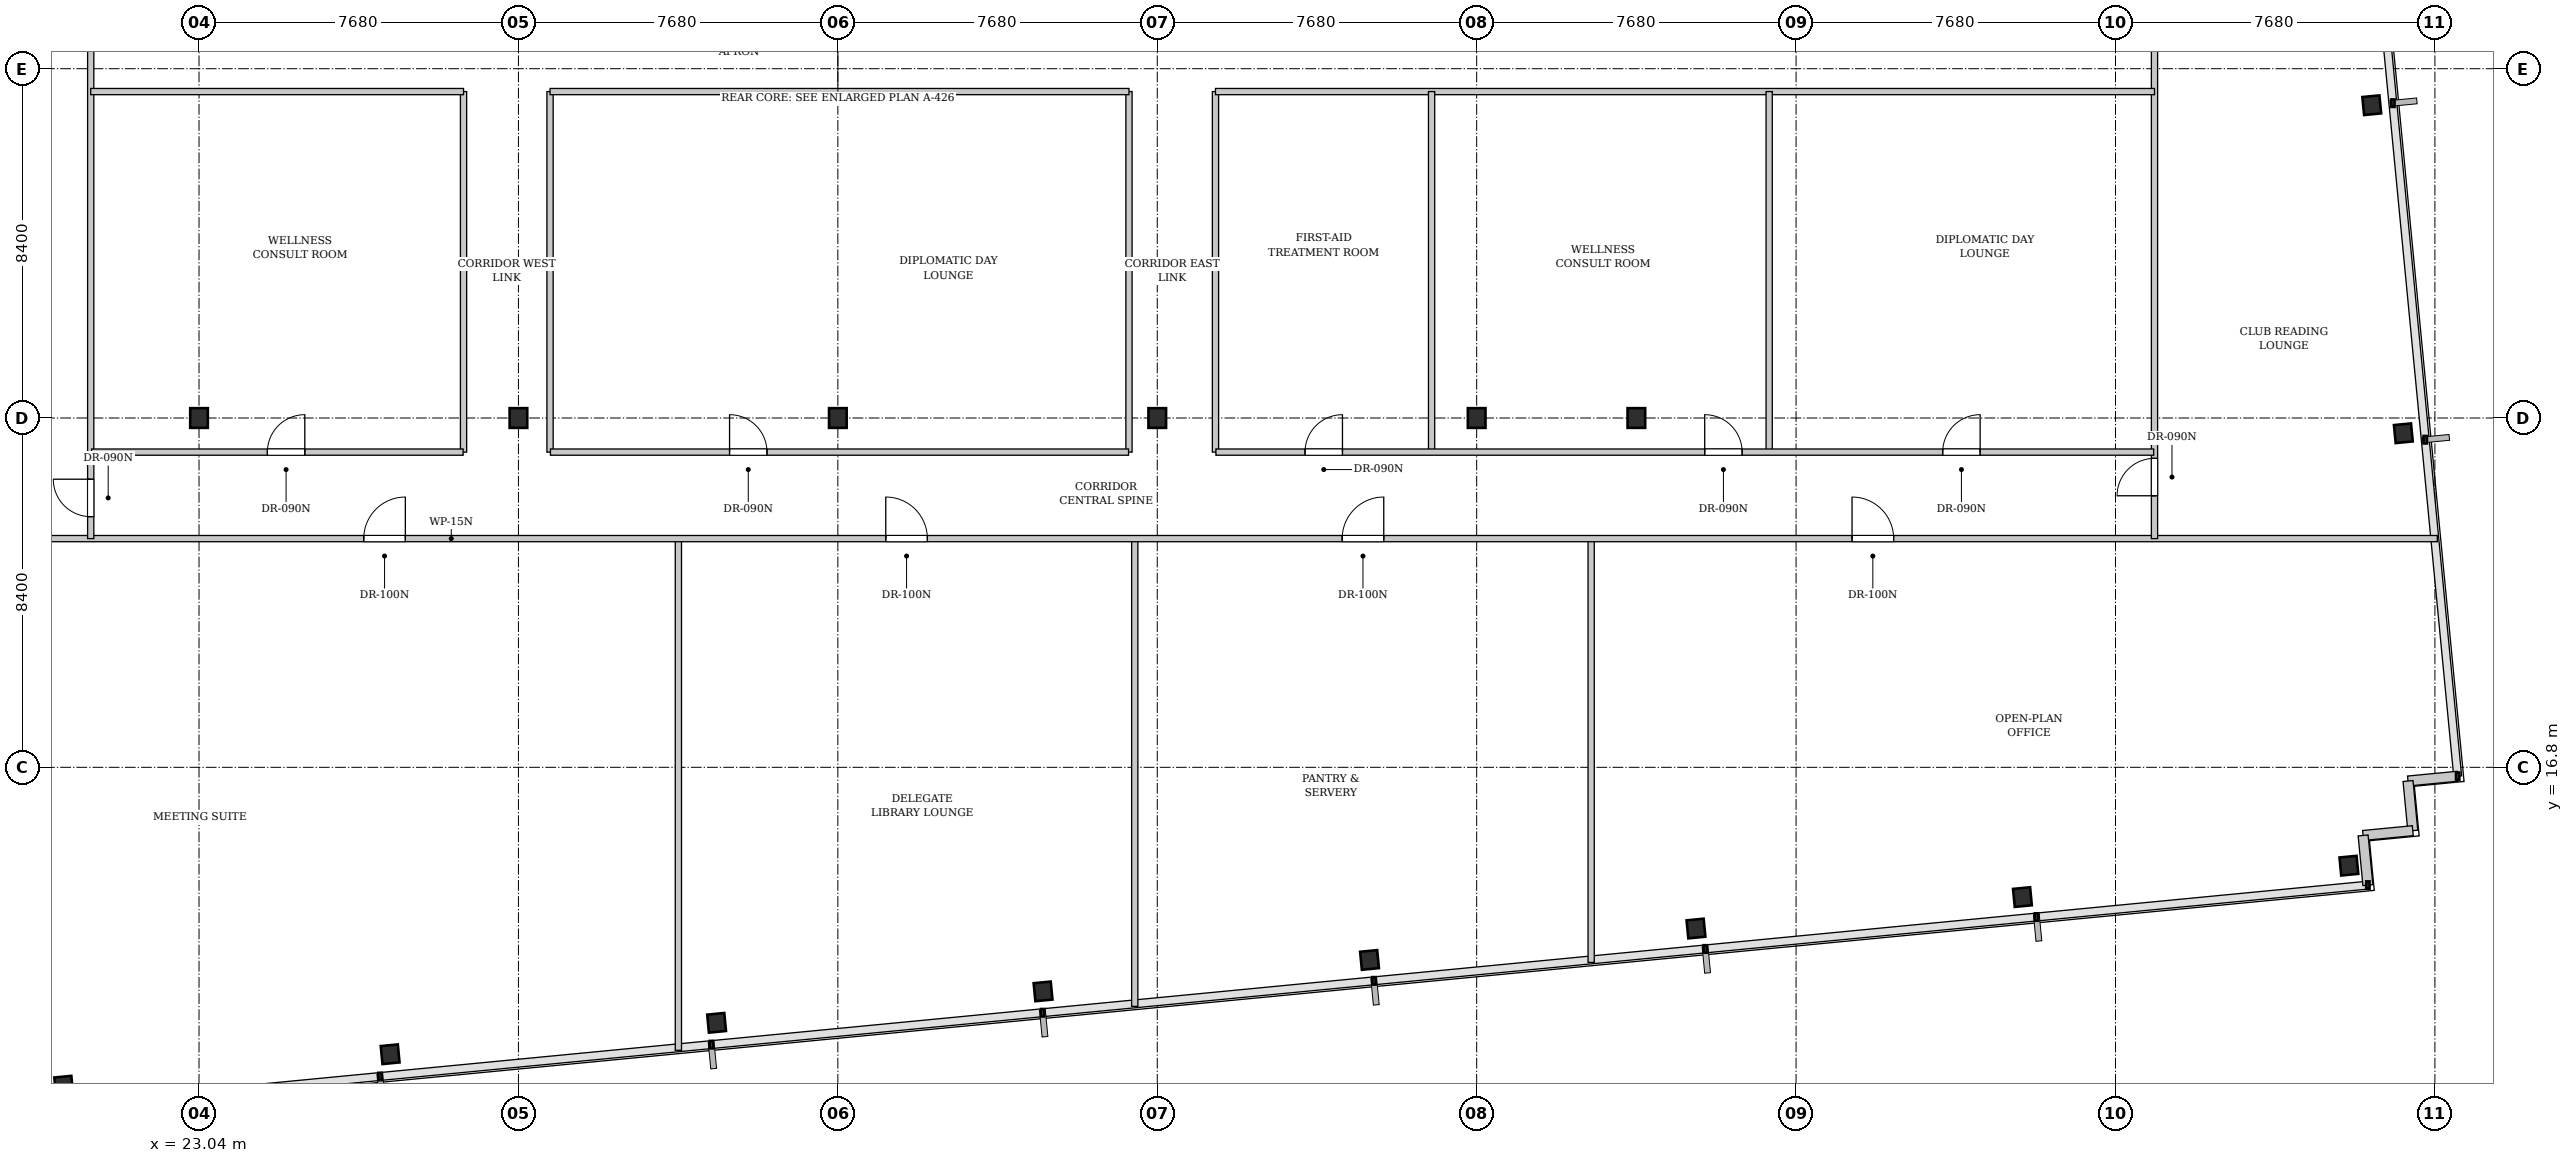
"""IFC4 building model, lengths in metres.
Left out: names, types, materials, properties, quantities, classifications, styles, units other than length and angle.
Written with IfcOpenShell. Run it as: python <this file> out.ifc"""

import sys

from ifc_helpers import new_model, si_unit, direction, frame, frame_2d, origin, origin_2d, place, context, subcontext, project, spatial, rectangle, i_section, extrude, element, fill, save


model = new_model("IFC4")
c1 = context("Model", 3, precision=1e-05, world=origin(), true_north=direction((0.0, 1.0)))
c2 = subcontext(c1, "Body", "Model", "MODEL_VIEW")
j1 = project(units=[si_unit("LENGTHUNIT", "METRE"), si_unit("PLANEANGLEUNIT", "RADIAN")], contexts=[c1])
p1 = place(None, origin())
s1 = spatial("IfcSite", under=j1, at=p1, CompositionType="ELEMENT")
p2 = place(p1, origin())
s2 = spatial("IfcBuilding", under=s1, at=p2, CompositionType="ELEMENT")
p3 = place(p2, frame((0.0, 0.0, 96.5)))
s3 = spatial("IfcBuildingStorey", under=s2, at=p3, CompositionType="ELEMENT", Elevation=96.5)
for number, where, z_axis, x_axis in (
    (1, (23.04, 25.2, 0.0), (0.0, 0.0, 1.0), (1.0, 0.0, 0.0)),
    (2, (30.72, 25.2, 0.0), (0.0, 0.0, 1.0), (1.0, 0.0, 0.0)),
    (3, (38.4, 25.2, 0.0), (0.0, 0.0, 1.0), (1.0, 0.0, 0.0)),
    (4, (46.08, 25.2, 0.0), (0.0, 0.0, 1.0), (1.0, 0.0, 0.0)),
    (5, (53.76, 25.2, 0.0), (0.0, 0.0, 1.0), (1.0, 0.0, 0.0)),
    (6, (57.6, 25.2, 0.0), (0.0, 0.0, 1.0), (1.0, 0.0, 0.0)),
):
    element("IfcColumn", number, at=place(p3, frame(where, z_axis=z_axis, x_axis=x_axis)), inside=s3, PredefinedType="COLUMN", context=c2, shape_type="SweptSolid", body=[
        extrude(i_section(OverallWidth=0.424, OverallDepth=0.474, WebThickness=0.047, FlangeThickness=0.077, FilletRadius=0.015, at=origin_2d()), origin(), (0.0, 0.0, 1.0), 3.4),
    ])
for number, where, z_axis, x_axis in (
    (7, (19.786, 9.144, 0.0), (0.0, 0.0, 1.0), (0.995, 0.096, 0.0)),
    (8, (27.635, 9.9, 0.0), (0.0, 0.0, 1.0), (0.995, 0.096, 0.0)),
    (9, (35.485, 10.656, 0.0), (0.0, 0.0, 1.0), (0.995, 0.096, 0.0)),
    (10, (43.334, 11.412, 0.0), (0.0, 0.0, 1.0), (0.995, 0.096, 0.0)),
    (11, (51.184, 12.167, 0.0), (0.0, 0.0, 1.0), (0.995, 0.096, 0.0)),
    (12, (59.033, 12.923, 0.0), (0.0, 0.0, 1.0), (0.995, 0.096, 0.0)),
    (13, (66.883, 13.679, 0.0), (0.0, 0.0, 1.0), (0.995, 0.096, 0.0)),
    (14, (74.732, 14.435, 0.0), (0.0, 0.0, 1.0), (0.995, 0.096, 0.0)),
    (15, (76.041, 24.833, 0.0), (0.0, 0.0, 1.0), (0.995, 0.096, 0.0)),
    (16, (75.282, 32.722, 0.0), (0.0, 0.0, 1.0), (0.995, 0.096, 0.0)),
):
    element("IfcColumn", number, at=place(p3, frame(where, z_axis=z_axis, x_axis=x_axis)), inside=s3, PredefinedType="COLUMN", context=c2, shape_type="SweptSolid", body=[
        extrude(i_section(OverallWidth=0.412, OverallDepth=0.435, WebThickness=0.036, FlangeThickness=0.058, FilletRadius=0.015, at=origin_2d()), origin(), (0.0, 0.0, 1.0), 3.4),
    ])
p4 = place(p3, frame((19.427, 8.597, 0.0), z_axis=(0.0, 0.0, 1.0), x_axis=(-0.095817067274, 0.995398960025, 0.0)))
e17 = element("IfcWall", 17, at=p4, inside=s3, PredefinedType="SOLIDWALL", context=c2, shape_type="SweptSolid", body=[
    extrude(rectangle(XDim=1.2, YDim=0.24, at=frame_2d((0.6, 0.0))), origin(), (0.0, 0.0, 1.0), 3.18),
])
p5 = place(p3, frame((77.348, 16.586, 0.0), z_axis=(0.0, 0.0, 1.0), x_axis=(-0.995397091755, -0.095836473879, 0.0)))
e18 = element("IfcWall", 18, at=p5, inside=s3, PredefinedType="SOLIDWALL", context=c2, shape_type="SweptSolid", body=[
    extrude(rectangle(XDim=1.2, YDim=0.24, at=frame_2d((0.6, 0.0))), origin(), (0.0, 0.0, 1.0), 3.18),
])
for number, where, z_axis, x_axis in (
    (19, (76.153, 16.471, 0.0), (0.0, 0.0, 1.0), (0.096, -0.995, 0.0)),
    (20, (76.268, 15.276, 0.0), (0.0, 0.0, 1.0), (-0.995, -0.096, 0.0)),
):
    element("IfcWall", number, at=place(p3, frame(where, z_axis=z_axis, x_axis=x_axis)), inside=s3, PredefinedType="SOLIDWALL", context=c2, shape_type="SweptSolid", body=[
        extrude(rectangle(XDim=1.2, YDim=0.24, at=frame_2d((0.6, 0.0))), origin(), (0.0, 0.0, 1.0), 3.18),
    ])
p6 = place(p3, frame((75.074, 15.161, 0.0), z_axis=(0.0, 0.0, 1.0), x_axis=(0.095836473879, -0.995397091755, 0.0)))
e21 = element("IfcWall", 21, at=p6, inside=s3, PredefinedType="SOLIDWALL", context=c2, shape_type="SweptSolid", body=[
    extrude(rectangle(XDim=1.2, YDim=0.24, at=frame_2d((0.6, 0.0))), origin(), (0.0, 0.0, 1.0), 3.18),
])
p7 = place(p3, frame((34.566, 9.995, 0.0), z_axis=(0.0, 0.0, 1.0), x_axis=(0.0, 1.0, 0.0)))
e22 = element("IfcWall", 22, at=p7, inside=s3, PredefinedType="PARTITIONING", context=c2, shape_type="SweptSolid", body=[
    extrude(rectangle(XDim=12.325, YDim=0.15, at=frame_2d((6.163, 0.0))), origin(), (0.0, 0.0, 1.0), 3.18),
])
p8 = place(p3, frame((45.539, 11.052, 0.0), z_axis=(0.0, 0.0, 1.0), x_axis=(0.0, 1.0, 0.0)))
e23 = element("IfcWall", 23, at=p8, inside=s3, PredefinedType="PARTITIONING", context=c2, shape_type="SweptSolid", body=[
    extrude(rectangle(XDim=11.269, YDim=0.15, at=frame_2d((5.634, 0.0))), origin(), (0.0, 0.0, 1.0), 2.525),
])
p9 = place(p3, frame((56.513, 12.108, 0.0), z_axis=(0.0, 0.0, 1.0), x_axis=(0.0, 1.0, 0.0)))
e24 = element("IfcWall", 24, at=p9, inside=s3, PredefinedType="PARTITIONING", context=c2, shape_type="SweptSolid", body=[
    extrude(rectangle(XDim=10.212, YDim=0.15, at=frame_2d((5.106, 0.0))), origin(), (0.0, 0.0, 1.0), 3.18),
])
p10 = place(p3, frame((15.636, 22.3, 0.0), z_axis=(0.0, 0.0, 1.0), x_axis=(1.0, 0.0, 0.0)))
e25 = element("IfcWall", 25, at=p10, inside=s3, PredefinedType="PARTITIONING", context=c2, shape_type="SweptSolid", body=[
    extrude(rectangle(XDim=61.222, YDim=0.15, at=frame_2d((30.611, 0.0))), origin(), (0.0, 0.0, 1.0), 3.18),
])
p11 = place(p10, frame((11.365, 0.0, 0.0)))
e26 = element("IfcOpeningElement", 26, at=p11, cuts=e25, PredefinedType="OPENING", context=c2, shape_type="SweptSolid", body=[
    extrude(rectangle(XDim=1.0, YDim=2.15, at=frame_2d((0.5, 1.075))), frame((0.0, 0.085, 0.0), z_axis=(0.0, -1.0, 0.0), x_axis=(1.0, 0.0, 0.0)), (0.0, 0.0, 1.0), 0.17),
])
p12 = place(p10, frame((23.917, 0.0, 0.0)))
e27 = element("IfcOpeningElement", 27, at=p12, cuts=e25, PredefinedType="OPENING", context=c2, shape_type="SweptSolid", body=[
    extrude(rectangle(XDim=1.0, YDim=2.15, at=frame_2d((0.5, 1.075))), frame((0.0, 0.085, 0.0), z_axis=(0.0, -1.0, 0.0), x_axis=(1.0, 0.0, 0.0)), (0.0, 0.0, 1.0), 0.17),
])
p13 = place(p10, frame((34.89, 0.0, 0.0)))
e28 = element("IfcOpeningElement", 28, at=p13, cuts=e25, PredefinedType="OPENING", context=c2, shape_type="SweptSolid", body=[
    extrude(rectangle(XDim=1.0, YDim=2.15, at=frame_2d((0.5, 1.075))), frame((0.0, 0.085, 0.0), z_axis=(0.0, -1.0, 0.0), x_axis=(1.0, 0.0, 0.0)), (0.0, 0.0, 1.0), 0.17),
])
p14 = place(p10, frame((47.15, 0.0, 0.0)))
e29 = element("IfcOpeningElement", 29, at=p14, cuts=e25, PredefinedType="OPENING", context=c2, shape_type="SweptSolid", body=[
    extrude(rectangle(XDim=1.0, YDim=2.15, at=frame_2d((0.5, 1.075))), frame((0.0, 0.085, 0.0), z_axis=(0.0, -1.0, 0.0), x_axis=(1.0, 0.0, 0.0)), (0.0, 0.0, 1.0), 0.17),
])
p15 = place(p3, frame((20.436, 22.3, 0.0), z_axis=(0.0, 0.0, 1.0), x_axis=(0.0, 1.0, 0.0)))
e30 = element("IfcWall", 30, at=p15, inside=s3, PredefinedType="PARTITIONING", context=c2, shape_type="SweptSolid", body=[
    extrude(rectangle(XDim=23.948, YDim=0.15, at=frame_2d((11.974, 0.0))), origin(), (0.0, 0.0, 1.0), 3.18),
])
p16 = place(p15, frame((0.528, 0.0, 0.0)))
e31 = element("IfcOpeningElement", 31, at=p16, cuts=e30, PredefinedType="OPENING", context=c2, shape_type="SweptSolid", body=[
    extrude(rectangle(XDim=0.9, YDim=2.15, at=frame_2d((0.45, 1.075))), frame((0.0, 0.085, 0.0), z_axis=(0.0, -1.0, 0.0), x_axis=(1.0, 0.0, 0.0)), (0.0, 0.0, 1.0), 0.17),
])
p17 = place(p3, frame((70.058, 22.3, 0.0), z_axis=(0.0, 0.0, 1.0), x_axis=(0.0, 1.0, 0.0)))
e32 = element("IfcWall", 32, at=p17, inside=s3, PredefinedType="PARTITIONING", context=c2, shape_type="SweptSolid", body=[
    extrude(rectangle(XDim=28.726, YDim=0.15, at=frame_2d((14.363, 0.0))), origin(), (0.0, 0.0, 1.0), 3.18),
])
p18 = place(p17, frame((1.03, 0.0, 0.0)))
e33 = element("IfcOpeningElement", 33, at=p18, cuts=e32, PredefinedType="OPENING", context=c2, shape_type="SweptSolid", body=[
    extrude(rectangle(XDim=0.9, YDim=2.15, at=frame_2d((0.45, 1.075))), frame((0.0, 0.085, 0.0), z_axis=(0.0, -1.0, 0.0), x_axis=(1.0, 0.0, 0.0)), (0.0, 0.0, 1.0), 0.17),
])
for number, where, z_axis, x_axis in (
    (34, (29.4, 24.38, 0.0), (0.0, 0.0, 1.0), (0.0, 1.0, 0.0)),
    (35, (31.48, 24.38, 0.0), (0.0, 0.0, 1.0), (0.0, 1.0, 0.0)),
    (36, (45.4, 24.38, 0.0), (0.0, 0.0, 1.0), (0.0, 1.0, 0.0)),
    (37, (47.48, 24.38, 0.0), (0.0, 0.0, 1.0), (0.0, 1.0, 0.0)),
):
    element("IfcWall", number, at=place(p3, frame(where, z_axis=z_axis, x_axis=x_axis)), inside=s3, PredefinedType="PARTITIONING", context=c2, shape_type="SweptSolid", body=[
        extrude(rectangle(XDim=8.67, YDim=0.15, at=frame_2d((4.335, 0.0))), origin(), (0.0, 0.0, 1.0), 3.18),
    ])
p19 = place(p3, frame((20.436, 33.05, 0.0), z_axis=(0.0, 0.0, 1.0), x_axis=(1.0, 0.0, 0.0)))
e38 = element("IfcWall", 38, at=p19, inside=s3, PredefinedType="PARTITIONING", context=c2, shape_type="SweptSolid", body=[
    extrude(rectangle(XDim=8.964, YDim=0.15, at=frame_2d((4.482, 0.0))), origin(), (0.0, 0.0, 1.0), 3.18),
])
p20 = place(p3, frame((31.48, 33.05, 0.0), z_axis=(0.0, 0.0, 1.0), x_axis=(1.0, 0.0, 0.0)))
e39 = element("IfcWall", 39, at=p20, inside=s3, PredefinedType="PARTITIONING", context=c2, shape_type="SweptSolid", body=[
    extrude(rectangle(XDim=13.92, YDim=0.15, at=frame_2d((6.96, 0.0))), origin(), (0.0, 0.0, 1.0), 3.18),
])
p21 = place(p3, frame((47.48, 33.05, 0.0), z_axis=(0.0, 0.0, 1.0), x_axis=(1.0, 0.0, 0.0)))
e40 = element("IfcWall", 40, at=p21, inside=s3, PredefinedType="PARTITIONING", context=c2, shape_type="SweptSolid", body=[
    extrude(rectangle(XDim=22.578, YDim=0.15, at=frame_2d((11.289, 0.0))), origin(), (0.0, 0.0, 1.0), 2.525),
])
p22 = place(p3, frame((20.456, 24.38, 0.0), z_axis=(0.0, 0.0, 1.0), x_axis=(1.0, 0.0, 0.0)))
e41 = element("IfcWall", 41, at=p22, inside=s3, PredefinedType="PARTITIONING", context=c2, shape_type="SweptSolid", body=[
    extrude(rectangle(XDim=8.934, YDim=0.15, at=frame_2d((4.467, 0.0))), origin(), (0.0, 0.0, 1.0), 3.18),
])
p23 = place(p22, frame((4.227, 0.0, 0.0)))
e42 = element("IfcOpeningElement", 42, at=p23, cuts=e41, PredefinedType="OPENING", context=c2, shape_type="SweptSolid", body=[
    extrude(rectangle(XDim=0.9, YDim=2.15, at=frame_2d((0.45, 1.075))), frame((0.0, 0.085, 0.0), z_axis=(0.0, -1.0, 0.0), x_axis=(1.0, 0.0, 0.0)), (0.0, 0.0, 1.0), 0.17),
])
p24 = place(p3, frame((31.49, 24.38, 0.0), z_axis=(0.0, 0.0, 1.0), x_axis=(1.0, 0.0, 0.0)))
e43 = element("IfcWall", 43, at=p24, inside=s3, PredefinedType="PARTITIONING", context=c2, shape_type="SweptSolid", body=[
    extrude(rectangle(XDim=13.9, YDim=0.15, at=frame_2d((6.95, 0.0))), origin(), (0.0, 0.0, 1.0), 3.18),
])
p25 = place(p24, frame((4.306, 0.0, 0.0)))
e44 = element("IfcOpeningElement", 44, at=p25, cuts=e43, PredefinedType="OPENING", context=c2, shape_type="SweptSolid", body=[
    extrude(rectangle(XDim=0.9, YDim=2.15, at=frame_2d((0.45, 1.075))), frame((0.0, 0.085, 0.0), z_axis=(0.0, -1.0, 0.0), x_axis=(1.0, 0.0, 0.0)), (0.0, 0.0, 1.0), 0.17),
])
for number, where, z_axis, x_axis in (
    (45, (52.676, 24.38, 0.0), (0.0, 0.0, 1.0), (0.0, 1.0, 0.0)),
    (46, (60.793, 24.38, 0.0), (0.0, 0.0, 1.0), (0.0, 1.0, 0.0)),
):
    element("IfcWall", number, at=place(p3, frame(where, z_axis=z_axis, x_axis=x_axis)), inside=s3, PredefinedType="PARTITIONING", context=c2, shape_type="SweptSolid", body=[
        extrude(rectangle(XDim=8.67, YDim=0.15, at=frame_2d((4.335, 0.0))), origin(), (0.0, 0.0, 1.0), 3.18),
    ])
p26 = place(p3, frame((47.49, 24.38, 0.0), z_axis=(0.0, 0.0, 1.0), x_axis=(1.0, 0.0, 0.0)))
e47 = element("IfcWall", 47, at=p26, inside=s3, PredefinedType="PARTITIONING", context=c2, shape_type="SweptSolid", body=[
    extrude(rectangle(XDim=22.548, YDim=0.15, at=frame_2d((11.274, 0.0))), origin(), (0.0, 0.0, 1.0), 3.18),
])
p27 = place(p26, frame((2.143, 0.0, 0.0)))
e48 = element("IfcOpeningElement", 48, at=p27, cuts=e47, PredefinedType="OPENING", context=c2, shape_type="SweptSolid", body=[
    extrude(rectangle(XDim=0.9, YDim=2.15, at=frame_2d((0.45, 1.075))), frame((0.0, 0.085, 0.0), z_axis=(0.0, -1.0, 0.0), x_axis=(1.0, 0.0, 0.0)), (0.0, 0.0, 1.0), 0.17),
])
p28 = place(p26, frame((11.753, 0.0, 0.0)))
e49 = element("IfcOpeningElement", 49, at=p28, cuts=e47, PredefinedType="OPENING", context=c2, shape_type="SweptSolid", body=[
    extrude(rectangle(XDim=0.9, YDim=2.15, at=frame_2d((0.45, 1.075))), frame((0.0, 0.085, 0.0), z_axis=(0.0, -1.0, 0.0), x_axis=(1.0, 0.0, 0.0)), (0.0, 0.0, 1.0), 0.17),
])
p29 = place(p26, frame((17.476, 0.0, 0.0)))
e50 = element("IfcOpeningElement", 50, at=p29, cuts=e47, PredefinedType="OPENING", context=c2, shape_type="SweptSolid", body=[
    extrude(rectangle(XDim=0.9, YDim=2.15, at=frame_2d((0.45, 1.075))), frame((0.0, 0.085, 0.0), z_axis=(0.0, -1.0, 0.0), x_axis=(1.0, 0.0, 0.0)), (0.0, 0.0, 1.0), 0.17),
])
p30 = place(p11, origin())
e51 = element("IfcDoor", 51, at=p30, inside=s3, OperationType="SINGLE_SWING_RIGHT", PredefinedType="DOOR", context=c2, shape_type="SweptSolid", body=[
    extrude(rectangle(XDim=1.0, YDim=2.15, at=frame_2d((0.5, 1.075))), frame((0.0, 0.025, 0.0), z_axis=(0.0, -1.0, 0.0), x_axis=(1.0, 0.0, 0.0)), (0.0, 0.0, 1.0), 0.05),
])
fill(e26, e51)
p31 = place(p12, origin())
e52 = element("IfcDoor", 52, at=p31, inside=s3, OperationType="SINGLE_SWING_LEFT", PredefinedType="DOOR", context=c2, shape_type="SweptSolid", body=[
    extrude(rectangle(XDim=1.0, YDim=2.15, at=frame_2d((0.5, 1.075))), frame((0.0, 0.025, 0.0), z_axis=(0.0, -1.0, 0.0), x_axis=(1.0, 0.0, 0.0)), (0.0, 0.0, 1.0), 0.05),
])
fill(e27, e52)
p32 = place(p13, origin())
e53 = element("IfcDoor", 53, at=p32, inside=s3, OperationType="SINGLE_SWING_RIGHT", PredefinedType="DOOR", context=c2, shape_type="SweptSolid", body=[
    extrude(rectangle(XDim=1.0, YDim=2.15, at=frame_2d((0.5, 1.075))), frame((0.0, 0.025, 0.0), z_axis=(0.0, -1.0, 0.0), x_axis=(1.0, 0.0, 0.0)), (0.0, 0.0, 1.0), 0.05),
])
fill(e28, e53)
p33 = place(p14, origin())
e54 = element("IfcDoor", 54, at=p33, inside=s3, OperationType="SINGLE_SWING_LEFT", PredefinedType="DOOR", context=c2, shape_type="SweptSolid", body=[
    extrude(rectangle(XDim=1.0, YDim=2.15, at=frame_2d((0.5, 1.075))), frame((0.0, 0.025, 0.0), z_axis=(0.0, -1.0, 0.0), x_axis=(1.0, 0.0, 0.0)), (0.0, 0.0, 1.0), 0.05),
])
fill(e29, e54)
p34 = place(p16, origin())
e55 = element("IfcDoor", 55, at=p34, inside=s3, OperationType="SINGLE_SWING_RIGHT", PredefinedType="DOOR", context=c2, shape_type="SweptSolid", body=[
    extrude(rectangle(XDim=0.9, YDim=2.15, at=frame_2d((0.45, 1.075))), frame((0.0, 0.025, 0.0), z_axis=(0.0, -1.0, 0.0), x_axis=(1.0, 0.0, 0.0)), (0.0, 0.0, 1.0), 0.05),
])
fill(e31, e55)
p35 = place(p18, origin())
e56 = element("IfcDoor", 56, at=p35, inside=s3, OperationType="SINGLE_SWING_LEFT", PredefinedType="DOOR", context=c2, shape_type="SweptSolid", body=[
    extrude(rectangle(XDim=0.9, YDim=2.15, at=frame_2d((0.45, 1.075))), frame((0.0, 0.025, 0.0), z_axis=(0.0, -1.0, 0.0), x_axis=(1.0, 0.0, 0.0)), (0.0, 0.0, 1.0), 0.05),
])
fill(e33, e56)
p36 = place(p23, origin())
e57 = element("IfcDoor", 57, at=p36, inside=s3, OperationType="SINGLE_SWING_RIGHT", PredefinedType="DOOR", context=c2, shape_type="SweptSolid", body=[
    extrude(rectangle(XDim=0.9, YDim=2.15, at=frame_2d((0.45, 1.075))), frame((0.0, 0.025, 0.0), z_axis=(0.0, -1.0, 0.0), x_axis=(1.0, 0.0, 0.0)), (0.0, 0.0, 1.0), 0.05),
])
fill(e42, e57)
p37 = place(p25, origin())
e58 = element("IfcDoor", 58, at=p37, inside=s3, OperationType="SINGLE_SWING_LEFT", PredefinedType="DOOR", context=c2, shape_type="SweptSolid", body=[
    extrude(rectangle(XDim=0.9, YDim=2.15, at=frame_2d((0.45, 1.075))), frame((0.0, 0.025, 0.0), z_axis=(0.0, -1.0, 0.0), x_axis=(1.0, 0.0, 0.0)), (0.0, 0.0, 1.0), 0.05),
])
fill(e44, e58)
p38 = place(p27, origin())
e59 = element("IfcDoor", 59, at=p38, inside=s3, OperationType="SINGLE_SWING_RIGHT", PredefinedType="DOOR", context=c2, shape_type="SweptSolid", body=[
    extrude(rectangle(XDim=0.9, YDim=2.15, at=frame_2d((0.45, 1.075))), frame((0.0, 0.025, 0.0), z_axis=(0.0, -1.0, 0.0), x_axis=(1.0, 0.0, 0.0)), (0.0, 0.0, 1.0), 0.05),
])
fill(e48, e59)
p39 = place(p28, origin())
e60 = element("IfcDoor", 60, at=p39, inside=s3, OperationType="SINGLE_SWING_LEFT", PredefinedType="DOOR", context=c2, shape_type="SweptSolid", body=[
    extrude(rectangle(XDim=0.9, YDim=2.15, at=frame_2d((0.45, 1.075))), frame((0.0, 0.025, 0.0), z_axis=(0.0, -1.0, 0.0), x_axis=(1.0, 0.0, 0.0)), (0.0, 0.0, 1.0), 0.05),
])
fill(e49, e60)
p40 = place(p29, origin())
e61 = element("IfcDoor", 61, at=p40, inside=s3, OperationType="SINGLE_SWING_RIGHT", PredefinedType="DOOR", context=c2, shape_type="SweptSolid", body=[
    extrude(rectangle(XDim=0.9, YDim=2.15, at=frame_2d((0.45, 1.075))), frame((0.0, 0.025, 0.0), z_axis=(0.0, -1.0, 0.0), x_axis=(1.0, 0.0, 0.0)), (0.0, 0.0, 1.0), 0.05),
])
fill(e50, e61)
save(model, sys.argv[1])
